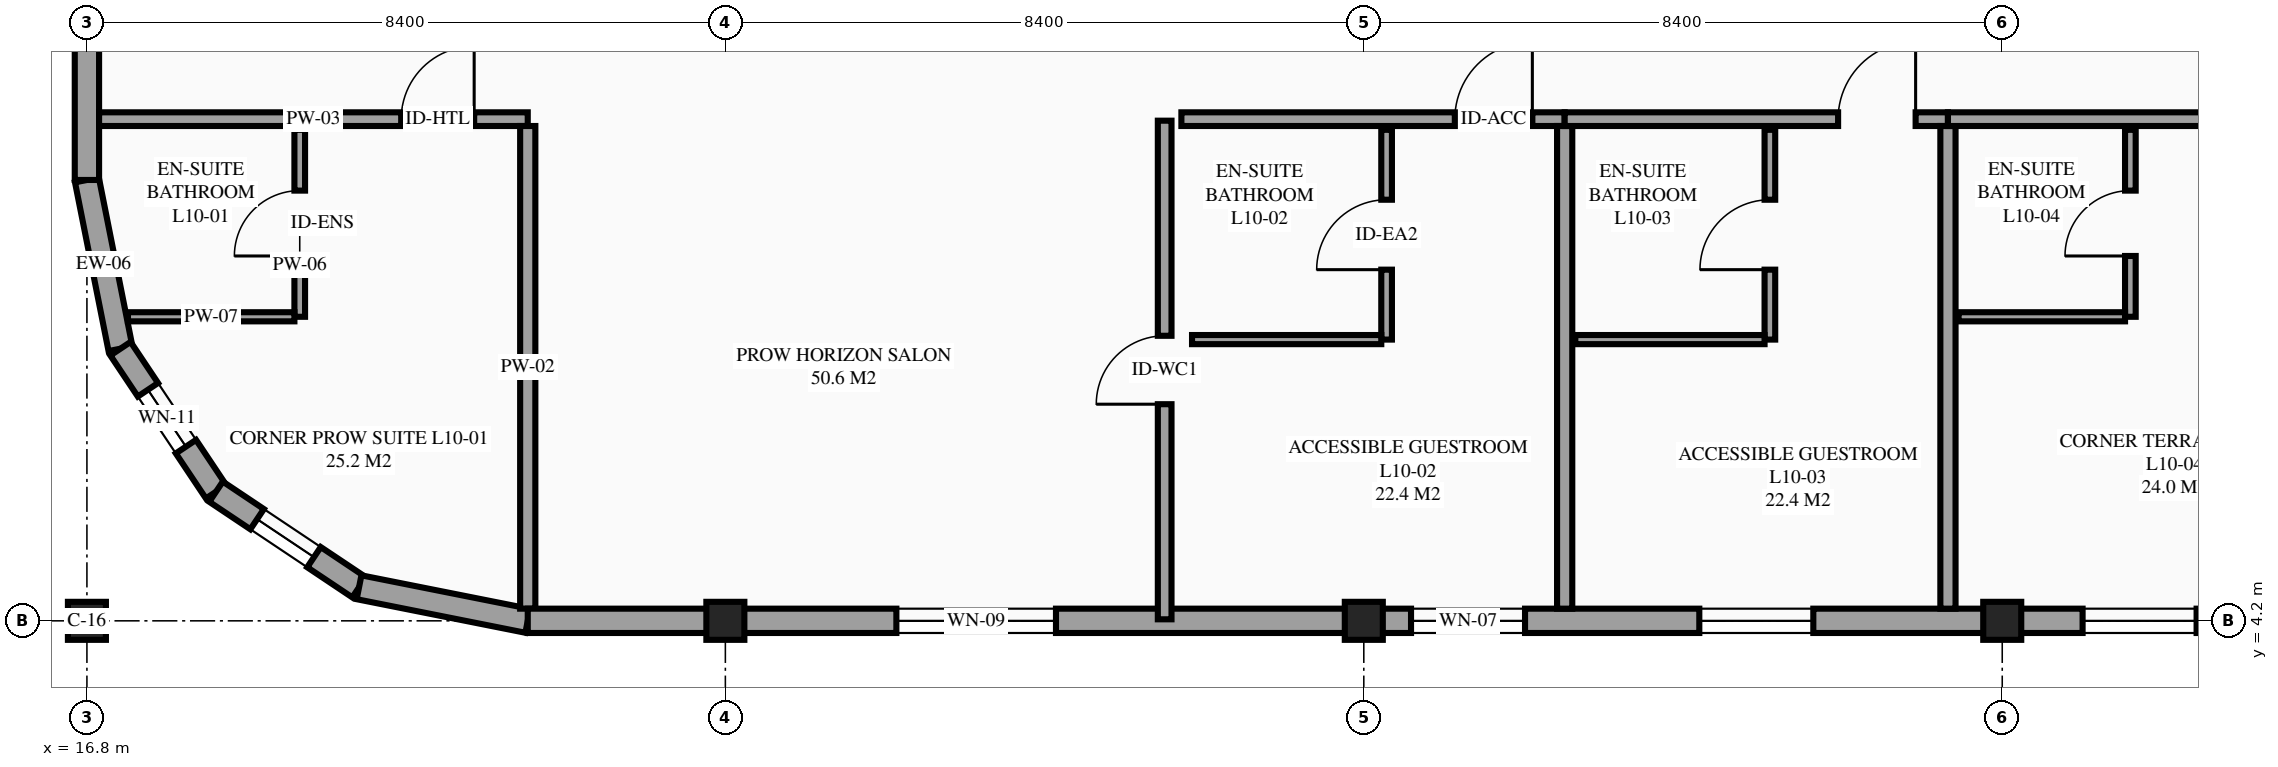
"""IFC4 building model, lengths in metres.
Left out: names, types, materials, properties, quantities, classifications, styles, units other than length and angle.
Written with IfcOpenShell. Run it as: python <this file> out.ifc"""

import sys

from ifc_helpers import new_model, si_unit, direction, frame, frame_2d, origin, origin_2d, place, context, subcontext, project, spatial, rectangle, extrude, element, fill, save


model = new_model("IFC4")
c1 = context("Model", 3, precision=1e-05, world=origin(), true_north=direction((0.0, 1.0)))
c2 = subcontext(c1, "Body", "Model", "MODEL_VIEW")
j1 = project(units=[si_unit("LENGTHUNIT", "METRE"), si_unit("PLANEANGLEUNIT", "RADIAN")], contexts=[c1])
p1 = place(None, origin())
s1 = spatial("IfcSite", under=j1, at=p1, CompositionType="ELEMENT")
p2 = place(p1, origin())
s2 = spatial("IfcBuilding", under=s1, at=p2, CompositionType="ELEMENT")
p3 = place(p2, frame((0.0, 0.0, 39.9)))
s3 = spatial("IfcBuildingStorey", under=s2, at=p3, CompositionType="ELEMENT", Elevation=39.9)
for number, where, z_axis, x_axis in (
    (1, (16.8, 4.2, 0.0), (0.0, 0.0, 1.0), (1.0, 0.0, 0.0)),
    (2, (25.2, 4.2, 0.0), (0.0, 0.0, 1.0), (1.0, 0.0, 0.0)),
    (3, (33.6, 4.2, 0.0), (0.0, 0.0, 1.0), (1.0, 0.0, 0.0)),
    (4, (42.0, 4.2, 0.0), (0.0, 0.0, 1.0), (1.0, 0.0, 0.0)),
):
    element("IfcColumn", number, at=place(p3, frame(where, z_axis=z_axis, x_axis=x_axis)), inside=s3, PredefinedType="COLUMN", context=c2, shape_type="SweptSolid", body=[
        extrude(rectangle(XDim=0.5, YDim=0.5, at=origin_2d()), origin(), (0.0, 0.0, 1.0), 3.6),
    ])
p4 = place(p3, frame((16.8, 10.0, 0.0), z_axis=(0.0, 0.0, 1.0), x_axis=(0.195057908159, -0.980791727363, 0.0)))
e5 = element("IfcWall", 5, at=p4, inside=s3, PredefinedType="STANDARD", context=c2, shape_type="SweptSolid", body=[
    extrude(rectangle(XDim=2.263, YDim=0.32, at=frame_2d((1.131, 0.0))), origin(), (0.0, 0.0, 1.0), 2.53),
])
p5 = place(p3, frame((17.241, 7.781, 0.0), z_axis=(0.0, 0.0, 1.0), x_axis=(0.555546297918, -0.831485604728, 0.0)))
e6 = element("IfcWall", 6, at=p5, inside=s3, PredefinedType="STANDARD", context=c2, shape_type="SweptSolid", body=[
    extrude(rectangle(XDim=2.263, YDim=0.32, at=frame_2d((1.132, 0.0))), origin(), (0.0, 0.0, 1.0), 3.6),
])
p6 = place(p5, frame((0.65, 0.0, 0.75)))
e7 = element("IfcOpeningElement", 7, at=p6, cuts=e6, PredefinedType="OPENING", context=c2, shape_type="SweptSolid", body=[
    extrude(rectangle(XDim=0.9, YDim=1.55, at=frame_2d((0.45, 0.775))), frame((0.0, 0.17, 0.0), z_axis=(0.0, -1.0, 0.0), x_axis=(1.0, 0.0, 0.0)), (0.0, 0.0, 1.0), 0.34),
])
p7 = place(p3, frame((18.499, 5.899, 0.0), z_axis=(0.0, 0.0, 1.0), x_axis=(0.831502143458, -0.555521543618, 0.0)))
e8 = element("IfcWall", 8, at=p7, inside=s3, PredefinedType="STANDARD", context=c2, shape_type="SweptSolid", body=[
    extrude(rectangle(XDim=2.263, YDim=0.32, at=frame_2d((1.131, 0.0))), origin(), (0.0, 0.0, 1.0), 3.6),
])
p8 = place(p7, frame((0.65, 0.0, 0.75)))
e9 = element("IfcOpeningElement", 9, at=p8, cuts=e8, PredefinedType="OPENING", context=c2, shape_type="SweptSolid", body=[
    extrude(rectangle(XDim=0.9, YDim=1.55, at=frame_2d((0.45, 0.775))), frame((0.0, 0.17, 0.0), z_axis=(0.0, -1.0, 0.0), x_axis=(1.0, 0.0, 0.0)), (0.0, 0.0, 1.0), 0.34),
])
p9 = place(p3, frame((20.38, 4.642, 0.0), z_axis=(0.0, 0.0, 1.0), x_axis=(0.98077519094, -0.195141038321, 0.0)))
e10 = element("IfcWall", 10, at=p9, inside=s3, PredefinedType="STANDARD", context=c2, shape_type="SweptSolid", body=[
    extrude(rectangle(XDim=2.263, YDim=0.32, at=frame_2d((1.132, 0.0))), origin(), (0.0, 0.0, 1.0), 2.88),
])
p10 = place(p3, frame((25.2, 4.2, 0.0), z_axis=(0.0, 0.0, 1.0), x_axis=(1.0, 0.0, 0.0)))
e11 = element("IfcWall", 11, at=p10, inside=s3, PredefinedType="STANDARD", context=c2, shape_type="SweptSolid", body=[
    extrude(rectangle(XDim=16.8, YDim=0.32, at=frame_2d((8.4, 0.0))), origin(), (0.0, 0.0, 1.0), 2.63),
])
p11 = place(p10, frame((9.021, 0.0, 0.85)))
e12 = element("IfcOpeningElement", 12, at=p11, cuts=e11, PredefinedType="OPENING", context=c2, shape_type="SweptSolid", body=[
    extrude(rectangle(XDim=1.5, YDim=1.5, at=frame_2d((0.75, 0.75))), frame((0.0, 0.17, 0.0), z_axis=(0.0, -1.0, 0.0), x_axis=(1.0, 0.0, 0.0)), (0.0, 0.0, 1.0), 0.34),
])
p12 = place(p10, frame((12.814, 0.0, 0.85)))
e13 = element("IfcOpeningElement", 13, at=p12, cuts=e11, PredefinedType="OPENING", context=c2, shape_type="SweptSolid", body=[
    extrude(rectangle(XDim=1.5, YDim=1.5, at=frame_2d((0.75, 0.75))), frame((0.0, 0.17, 0.0), z_axis=(0.0, -1.0, 0.0), x_axis=(1.0, 0.0, 0.0)), (0.0, 0.0, 1.0), 0.34),
])
p13 = place(p10, frame((2.25, 0.0, 0.75)))
e14 = element("IfcOpeningElement", 14, at=p13, cuts=e11, PredefinedType="OPENING", context=c2, shape_type="SweptSolid", body=[
    extrude(rectangle(XDim=2.1, YDim=1.5, at=frame_2d((1.05, 0.75))), frame((0.0, 0.17, 0.0), z_axis=(0.0, -1.0, 0.0), x_axis=(1.0, 0.0, 0.0)), (0.0, 0.0, 1.0), 0.34),
])
p14 = place(p3, frame((16.8, 21.0, 0.0), z_axis=(0.0, 0.0, 1.0), x_axis=(0.0, -1.0, 0.0)))
e15 = element("IfcWall", 15, at=p14, inside=s3, PredefinedType="STANDARD", context=c2, shape_type="SweptSolid", body=[
    extrude(rectangle(XDim=11.0, YDim=0.32, at=frame_2d((5.5, 0.0))), origin(), (0.0, 0.0, 1.0), 2.48),
])
p15 = place(p3, frame((16.96, 10.8, 0.0), z_axis=(0.0, 0.0, 1.0), x_axis=(1.0, 0.0, 0.0)))
e16 = element("IfcWall", 16, at=p15, inside=s3, PredefinedType="PARTITIONING", context=c2, shape_type="SweptSolid", body=[
    extrude(rectangle(XDim=5.64, YDim=0.18, at=frame_2d((2.82, 0.0))), origin(), (0.0, 0.0, 1.0), 3.375),
])
p16 = place(p15, frame((3.975, 0.0, 0.0)))
e17 = element("IfcOpeningElement", 17, at=p16, cuts=e16, PredefinedType="OPENING", context=c2, shape_type="SweptSolid", body=[
    extrude(rectangle(XDim=0.96, YDim=2.15, at=frame_2d((0.48, 1.075))), frame((0.0, 0.1, 0.0), z_axis=(0.0, -1.0, 0.0), x_axis=(1.0, 0.0, 0.0)), (0.0, 0.0, 1.0), 0.2),
])
p17 = place(p3, frame((22.6, 4.36, 0.0), z_axis=(0.0, 0.0, 1.0), x_axis=(0.0, 1.0, 0.0)))
e18 = element("IfcWall", 18, at=p17, inside=s3, PredefinedType="PARTITIONING", context=c2, shape_type="SweptSolid", body=[
    extrude(rectangle(XDim=6.35, YDim=0.2, at=frame_2d((3.175, 0.0))), origin(), (0.0, 0.0, 1.0), 3.375),
])
p18 = place(p3, frame((19.6, 8.2, 0.0), z_axis=(0.0, 0.0, 1.0), x_axis=(0.0, 1.0, 0.0)))
e19 = element("IfcWall", 19, at=p18, inside=s3, PredefinedType="PARTITIONING", context=c2, shape_type="SweptSolid", body=[
    extrude(rectangle(XDim=2.46, YDim=0.14, at=frame_2d((1.23, 0.0))), origin(), (0.0, 0.0, 1.0), 3.375),
])
p19 = place(p18, frame((0.8, 0.0, 0.0)))
e20 = element("IfcOpeningElement", 20, at=p19, cuts=e19, PredefinedType="OPENING", context=c2, shape_type="SweptSolid", body=[
    extrude(rectangle(XDim=0.86, YDim=2.1, at=frame_2d((0.43, 1.05))), frame((0.0, 0.08, 0.0), z_axis=(0.0, -1.0, 0.0), x_axis=(1.0, 0.0, 0.0)), (0.0, 0.0, 1.0), 0.16),
])
p20 = place(p3, frame((17.34, 8.2, 0.0), z_axis=(0.0, 0.0, 1.0), x_axis=(1.0, 0.0, 0.0)))
e21 = element("IfcWall", 21, at=p20, inside=s3, PredefinedType="PARTITIONING", context=c2, shape_type="SweptSolid", body=[
    extrude(rectangle(XDim=2.19, YDim=0.12, at=frame_2d((1.095, 0.0))), origin(), (0.0, 0.0, 1.0), 3.375),
])
p21 = place(p3, frame((31.2, 10.8, 0.0), z_axis=(0.0, 0.0, 1.0), x_axis=(1.0, 0.0, 0.0)))
e22 = element("IfcWall", 22, at=p21, inside=s3, PredefinedType="PARTITIONING", context=c2, shape_type="SweptSolid", body=[
    extrude(rectangle(XDim=5.043, YDim=0.18, at=frame_2d((2.521, 0.0))), origin(), (0.0, 0.0, 1.0), 3.375),
])
p22 = place(p21, frame((3.598, 0.0, 0.0)))
e23 = element("IfcOpeningElement", 23, at=p22, cuts=e22, PredefinedType="OPENING", context=c2, shape_type="SweptSolid", body=[
    extrude(rectangle(XDim=1.02, YDim=2.15, at=frame_2d((0.51, 1.075))), frame((0.0, 0.1, 0.0), z_axis=(0.0, -1.0, 0.0), x_axis=(1.0, 0.0, 0.0)), (0.0, 0.0, 1.0), 0.2),
])
p23 = place(p3, frame((36.243, 4.36, 0.0), z_axis=(0.0, 0.0, 1.0), x_axis=(0.0, 1.0, 0.0)))
e24 = element("IfcWall", 24, at=p23, inside=s3, PredefinedType="PARTITIONING", context=c2, shape_type="SweptSolid", body=[
    extrude(rectangle(XDim=6.35, YDim=0.2, at=frame_2d((3.175, 0.0))), origin(), (0.0, 0.0, 1.0), 3.375),
])
p24 = place(p3, frame((33.9, 7.9, 0.0), z_axis=(0.0, 0.0, 1.0), x_axis=(0.0, 1.0, 0.0)))
e25 = element("IfcWall", 25, at=p24, inside=s3, PredefinedType="PARTITIONING", context=c2, shape_type="SweptSolid", body=[
    extrude(rectangle(XDim=2.76, YDim=0.14, at=frame_2d((1.38, 0.0))), origin(), (0.0, 0.0, 1.0), 3.375),
])
p25 = place(p24, frame((0.92, 0.0, 0.0)))
e26 = element("IfcOpeningElement", 26, at=p25, cuts=e25, PredefinedType="OPENING", context=c2, shape_type="SweptSolid", body=[
    extrude(rectangle(XDim=0.92, YDim=2.1, at=frame_2d((0.46, 1.05))), frame((0.0, 0.08, 0.0), z_axis=(0.0, -1.0, 0.0), x_axis=(1.0, 0.0, 0.0)), (0.0, 0.0, 1.0), 0.16),
])
p26 = place(p3, frame((31.34, 7.9, 0.0), z_axis=(0.0, 0.0, 1.0), x_axis=(1.0, 0.0, 0.0)))
e27 = element("IfcWall", 27, at=p26, inside=s3, PredefinedType="PARTITIONING", context=c2, shape_type="SweptSolid", body=[
    extrude(rectangle(XDim=2.49, YDim=0.12, at=frame_2d((1.245, 0.0))), origin(), (0.0, 0.0, 1.0), 3.375),
])
p27 = place(p3, frame((36.243, 10.8, 0.0), z_axis=(0.0, 0.0, 1.0), x_axis=(1.0, 0.0, 0.0)))
e28 = element("IfcWall", 28, at=p27, inside=s3, PredefinedType="PARTITIONING", context=c2, shape_type="SweptSolid", body=[
    extrude(rectangle(XDim=5.043, YDim=0.18, at=frame_2d((2.521, 0.0))), origin(), (0.0, 0.0, 1.0), 3.375),
])
p28 = place(p27, frame((3.597, 0.0, 0.0)))
e29 = element("IfcOpeningElement", 29, at=p28, cuts=e28, PredefinedType="OPENING", context=c2, shape_type="SweptSolid", body=[
    extrude(rectangle(XDim=1.02, YDim=2.15, at=frame_2d((0.51, 1.075))), frame((0.0, 0.1, 0.0), z_axis=(0.0, -1.0, 0.0), x_axis=(1.0, 0.0, 0.0)), (0.0, 0.0, 1.0), 0.2),
])
p29 = place(p3, frame((41.286, 4.36, 0.0), z_axis=(0.0, 0.0, 1.0), x_axis=(0.0, 1.0, 0.0)))
e30 = element("IfcWall", 30, at=p29, inside=s3, PredefinedType="PARTITIONING", context=c2, shape_type="SweptSolid", body=[
    extrude(rectangle(XDim=6.35, YDim=0.2, at=frame_2d((3.175, 0.0))), origin(), (0.0, 0.0, 1.0), 3.375),
])
p30 = place(p3, frame((38.943, 7.9, 0.0), z_axis=(0.0, 0.0, 1.0), x_axis=(0.0, 1.0, 0.0)))
e31 = element("IfcWall", 31, at=p30, inside=s3, PredefinedType="PARTITIONING", context=c2, shape_type="SweptSolid", body=[
    extrude(rectangle(XDim=2.76, YDim=0.14, at=frame_2d((1.38, 0.0))), origin(), (0.0, 0.0, 1.0), 3.375),
])
p31 = place(p30, frame((0.92, 0.0, 0.0)))
e32 = element("IfcOpeningElement", 32, at=p31, cuts=e31, PredefinedType="OPENING", context=c2, shape_type="SweptSolid", body=[
    extrude(rectangle(XDim=0.92, YDim=2.1, at=frame_2d((0.46, 1.05))), frame((0.0, 0.08, 0.0), z_axis=(0.0, -1.0, 0.0), x_axis=(1.0, 0.0, 0.0)), (0.0, 0.0, 1.0), 0.16),
])
p32 = place(p3, frame((36.383, 7.9, 0.0), z_axis=(0.0, 0.0, 1.0), x_axis=(1.0, 0.0, 0.0)))
e33 = element("IfcWall", 33, at=p32, inside=s3, PredefinedType="PARTITIONING", context=c2, shape_type="SweptSolid", body=[
    extrude(rectangle(XDim=2.49, YDim=0.12, at=frame_2d((1.245, 0.0))), origin(), (0.0, 0.0, 1.0), 3.375),
])
p33 = place(p3, frame((41.286, 10.8, 0.0), z_axis=(0.0, 0.0, 1.0), x_axis=(1.0, 0.0, 0.0)))
e34 = element("IfcWall", 34, at=p33, inside=s3, PredefinedType="PARTITIONING", context=c2, shape_type="SweptSolid", body=[
    extrude(rectangle(XDim=5.043, YDim=0.18, at=frame_2d((2.521, 0.0))), origin(), (0.0, 0.0, 1.0), 3.375),
])
p34 = place(p33, frame((3.514, 0.0, 0.0)))
e35 = element("IfcOpeningElement", 35, at=p34, cuts=e34, PredefinedType="OPENING", context=c2, shape_type="SweptSolid", body=[
    extrude(rectangle(XDim=0.96, YDim=2.15, at=frame_2d((0.48, 1.075))), frame((0.0, 0.1, 0.0), z_axis=(0.0, -1.0, 0.0), x_axis=(1.0, 0.0, 0.0)), (0.0, 0.0, 1.0), 0.2),
])
p35 = place(p3, frame((43.686, 8.2, 0.0), z_axis=(0.0, 0.0, 1.0), x_axis=(0.0, 1.0, 0.0)))
e36 = element("IfcWall", 36, at=p35, inside=s3, PredefinedType="PARTITIONING", context=c2, shape_type="SweptSolid", body=[
    extrude(rectangle(XDim=2.46, YDim=0.14, at=frame_2d((1.23, 0.0))), origin(), (0.0, 0.0, 1.0), 3.375),
])
p36 = place(p35, frame((0.8, 0.0, 0.0)))
e37 = element("IfcOpeningElement", 37, at=p36, cuts=e36, PredefinedType="OPENING", context=c2, shape_type="SweptSolid", body=[
    extrude(rectangle(XDim=0.86, YDim=2.1, at=frame_2d((0.43, 1.05))), frame((0.0, 0.08, 0.0), z_axis=(0.0, -1.0, 0.0), x_axis=(1.0, 0.0, 0.0)), (0.0, 0.0, 1.0), 0.16),
])
p37 = place(p3, frame((41.426, 8.2, 0.0), z_axis=(0.0, 0.0, 1.0), x_axis=(1.0, 0.0, 0.0)))
e38 = element("IfcWall", 38, at=p37, inside=s3, PredefinedType="PARTITIONING", context=c2, shape_type="SweptSolid", body=[
    extrude(rectangle(XDim=2.19, YDim=0.12, at=frame_2d((1.095, 0.0))), origin(), (0.0, 0.0, 1.0), 3.375),
])
p38 = place(p3, frame((30.98, 4.22, 0.0), z_axis=(0.0, 0.0, 1.0), x_axis=(0.0, 1.0, 0.0)))
e39 = element("IfcWall", 39, at=p38, inside=s3, PredefinedType="PARTITIONING", context=c2, shape_type="SweptSolid", body=[
    extrude(rectangle(XDim=6.56, YDim=0.18, at=frame_2d((3.28, 0.0))), origin(), (0.0, 0.0, 1.0), 3.375),
])
p39 = place(p38, frame((2.83, 0.0, 0.0)))
e40 = element("IfcOpeningElement", 40, at=p39, cuts=e39, PredefinedType="OPENING", context=c2, shape_type="SweptSolid", body=[
    extrude(rectangle(XDim=0.9, YDim=2.12, at=frame_2d((0.45, 1.06))), frame((0.0, 0.1, 0.0), z_axis=(0.0, -1.0, 0.0), x_axis=(1.0, 0.0, 0.0)), (0.0, 0.0, 1.0), 0.2),
])
p40 = place(p3, frame((22.6, 4.2, 0.0), z_axis=(0.0, 0.0, 1.0), x_axis=(1.0, 0.0, 0.0)))
e41 = element("IfcWall", 41, at=p40, inside=s3, PredefinedType="STANDARD", context=c2, shape_type="SweptSolid", body=[
    extrude(rectangle(XDim=2.6, YDim=0.32, at=frame_2d((1.3, 0.0))), origin(), (0.0, 0.0, 1.0), 2.88),
])
p41 = place(p3, frame((42.0, 4.2, 0.0), z_axis=(0.0, 0.0, 1.0), x_axis=(1.0, 0.0, 0.0)))
e42 = element("IfcWall", 42, at=p41, inside=s3, PredefinedType="STANDARD", context=c2, shape_type="SweptSolid", body=[
    extrude(rectangle(XDim=8.4, YDim=0.32, at=frame_2d((4.2, 0.0))), origin(), (0.0, 0.0, 1.0), 3.075),
])
p42 = place(p41, frame((1.057, 0.0, 0.85)))
e43 = element("IfcOpeningElement", 43, at=p42, cuts=e42, PredefinedType="OPENING", context=c2, shape_type="SweptSolid", body=[
    extrude(rectangle(XDim=1.5, YDim=1.5, at=frame_2d((0.75, 0.75))), frame((0.0, 0.17, 0.0), z_axis=(0.0, -1.0, 0.0), x_axis=(1.0, 0.0, 0.0)), (0.0, 0.0, 1.0), 0.34),
])
p43 = place(p41, frame((6.1, 0.0, 0.85)))
e44 = element("IfcOpeningElement", 44, at=p43, cuts=e42, PredefinedType="OPENING", context=c2, shape_type="SweptSolid", body=[
    extrude(rectangle(XDim=1.5, YDim=1.5, at=frame_2d((0.75, 0.75))), frame((0.0, 0.17, 0.0), z_axis=(0.0, -1.0, 0.0), x_axis=(1.0, 0.0, 0.0)), (0.0, 0.0, 1.0), 0.34),
])
p44 = place(p6, origin())
e45 = element("IfcWindow", 45, at=p44, inside=s3, PartitioningType="SINGLE_PANEL", PredefinedType="WINDOW", context=c2, shape_type="SweptSolid", body=[
    extrude(rectangle(XDim=0.9, YDim=1.55, at=frame_2d((0.45, 0.775))), frame((0.0, 0.03, 0.0), z_axis=(0.0, -1.0, 0.0), x_axis=(1.0, 0.0, 0.0)), (0.0, 0.0, 1.0), 0.06),
])
fill(e7, e45)
p45 = place(p8, origin())
e46 = element("IfcWindow", 46, at=p45, inside=s3, PartitioningType="SINGLE_PANEL", PredefinedType="WINDOW", context=c2, shape_type="SweptSolid", body=[
    extrude(rectangle(XDim=0.9, YDim=1.55, at=frame_2d((0.45, 0.775))), frame((0.0, 0.03, 0.0), z_axis=(0.0, -1.0, 0.0), x_axis=(1.0, 0.0, 0.0)), (0.0, 0.0, 1.0), 0.06),
])
fill(e9, e46)
p46 = place(p11, origin())
e47 = element("IfcWindow", 47, at=p46, inside=s3, PartitioningType="SINGLE_PANEL", PredefinedType="WINDOW", context=c2, shape_type="SweptSolid", body=[
    extrude(rectangle(XDim=1.5, YDim=1.5, at=frame_2d((0.75, 0.75))), frame((0.0, 0.03, 0.0), z_axis=(0.0, -1.0, 0.0), x_axis=(1.0, 0.0, 0.0)), (0.0, 0.0, 1.0), 0.06),
])
fill(e12, e47)
p47 = place(p12, origin())
e48 = element("IfcWindow", 48, at=p47, inside=s3, PartitioningType="SINGLE_PANEL", PredefinedType="WINDOW", context=c2, shape_type="SweptSolid", body=[
    extrude(rectangle(XDim=1.5, YDim=1.5, at=frame_2d((0.75, 0.75))), frame((0.0, 0.03, 0.0), z_axis=(0.0, -1.0, 0.0), x_axis=(1.0, 0.0, 0.0)), (0.0, 0.0, 1.0), 0.06),
])
fill(e13, e48)
p48 = place(p42, origin())
e49 = element("IfcWindow", 49, at=p48, inside=s3, PartitioningType="SINGLE_PANEL", PredefinedType="WINDOW", context=c2, shape_type="SweptSolid", body=[
    extrude(rectangle(XDim=1.5, YDim=1.5, at=frame_2d((0.75, 0.75))), frame((0.0, 0.03, 0.0), z_axis=(0.0, -1.0, 0.0), x_axis=(1.0, 0.0, 0.0)), (0.0, 0.0, 1.0), 0.06),
])
fill(e43, e49)
p49 = place(p13, origin())
e50 = element("IfcWindow", 50, at=p49, inside=s3, PartitioningType="SINGLE_PANEL", PredefinedType="WINDOW", context=c2, shape_type="SweptSolid", body=[
    extrude(rectangle(XDim=2.1, YDim=1.5, at=frame_2d((1.05, 0.75))), frame((0.0, 0.03, 0.0), z_axis=(0.0, -1.0, 0.0), x_axis=(1.0, 0.0, 0.0)), (0.0, 0.0, 1.0), 0.06),
])
fill(e14, e50)
p50 = place(p16, origin())
e51 = element("IfcDoor", 51, at=p50, inside=s3, OperationType="SINGLE_SWING_RIGHT", PredefinedType="DOOR", context=c2, shape_type="SweptSolid", body=[
    extrude(rectangle(XDim=0.96, YDim=2.15, at=frame_2d((0.48, 1.075))), frame((0.0, 0.025, 0.0), z_axis=(0.0, -1.0, 0.0), x_axis=(1.0, 0.0, 0.0)), (0.0, 0.0, 1.0), 0.05),
])
fill(e17, e51)
p51 = place(p19, origin())
e52 = element("IfcDoor", 52, at=p51, inside=s3, OperationType="SINGLE_SWING_LEFT", PredefinedType="DOOR", context=c2, shape_type="SweptSolid", body=[
    extrude(rectangle(XDim=0.86, YDim=2.1, at=frame_2d((0.43, 1.05))), frame((0.0, 0.025, 0.0), z_axis=(0.0, -1.0, 0.0), x_axis=(1.0, 0.0, 0.0)), (0.0, 0.0, 1.0), 0.05),
])
fill(e20, e52)
p52 = place(p22, origin())
e53 = element("IfcDoor", 53, at=p52, inside=s3, OperationType="SINGLE_SWING_RIGHT", PredefinedType="DOOR", context=c2, shape_type="SweptSolid", body=[
    extrude(rectangle(XDim=1.02, YDim=2.15, at=frame_2d((0.51, 1.075))), frame((0.0, 0.025, 0.0), z_axis=(0.0, -1.0, 0.0), x_axis=(1.0, 0.0, 0.0)), (0.0, 0.0, 1.0), 0.05),
])
fill(e23, e53)
p53 = place(p25, origin())
e54 = element("IfcDoor", 54, at=p53, inside=s3, OperationType="SINGLE_SWING_LEFT", PredefinedType="DOOR", context=c2, shape_type="SweptSolid", body=[
    extrude(rectangle(XDim=0.92, YDim=2.1, at=frame_2d((0.46, 1.05))), frame((0.0, 0.025, 0.0), z_axis=(0.0, -1.0, 0.0), x_axis=(1.0, 0.0, 0.0)), (0.0, 0.0, 1.0), 0.05),
])
fill(e26, e54)
p54 = place(p28, origin())
e55 = element("IfcDoor", 55, at=p54, inside=s3, OperationType="SINGLE_SWING_RIGHT", PredefinedType="DOOR", context=c2, shape_type="SweptSolid", body=[
    extrude(rectangle(XDim=1.02, YDim=2.15, at=frame_2d((0.51, 1.075))), frame((0.0, 0.025, 0.0), z_axis=(0.0, -1.0, 0.0), x_axis=(1.0, 0.0, 0.0)), (0.0, 0.0, 1.0), 0.05),
])
fill(e29, e55)
p55 = place(p31, origin())
e56 = element("IfcDoor", 56, at=p55, inside=s3, OperationType="SINGLE_SWING_LEFT", PredefinedType="DOOR", context=c2, shape_type="SweptSolid", body=[
    extrude(rectangle(XDim=0.92, YDim=2.1, at=frame_2d((0.46, 1.05))), frame((0.0, 0.025, 0.0), z_axis=(0.0, -1.0, 0.0), x_axis=(1.0, 0.0, 0.0)), (0.0, 0.0, 1.0), 0.05),
])
fill(e32, e56)
p56 = place(p36, origin())
e57 = element("IfcDoor", 57, at=p56, inside=s3, OperationType="SINGLE_SWING_LEFT", PredefinedType="DOOR", context=c2, shape_type="SweptSolid", body=[
    extrude(rectangle(XDim=0.86, YDim=2.1, at=frame_2d((0.43, 1.05))), frame((0.0, 0.025, 0.0), z_axis=(0.0, -1.0, 0.0), x_axis=(1.0, 0.0, 0.0)), (0.0, 0.0, 1.0), 0.05),
])
fill(e37, e57)
p57 = place(p39, origin())
e58 = element("IfcDoor", 58, at=p57, inside=s3, OperationType="SINGLE_SWING_LEFT", PredefinedType="DOOR", context=c2, shape_type="SweptSolid", body=[
    extrude(rectangle(XDim=0.9, YDim=2.12, at=frame_2d((0.45, 1.06))), frame((0.0, 0.025, 0.0), z_axis=(0.0, -1.0, 0.0), x_axis=(1.0, 0.0, 0.0)), (0.0, 0.0, 1.0), 0.05),
])
fill(e40, e58)
save(model, sys.argv[1])
